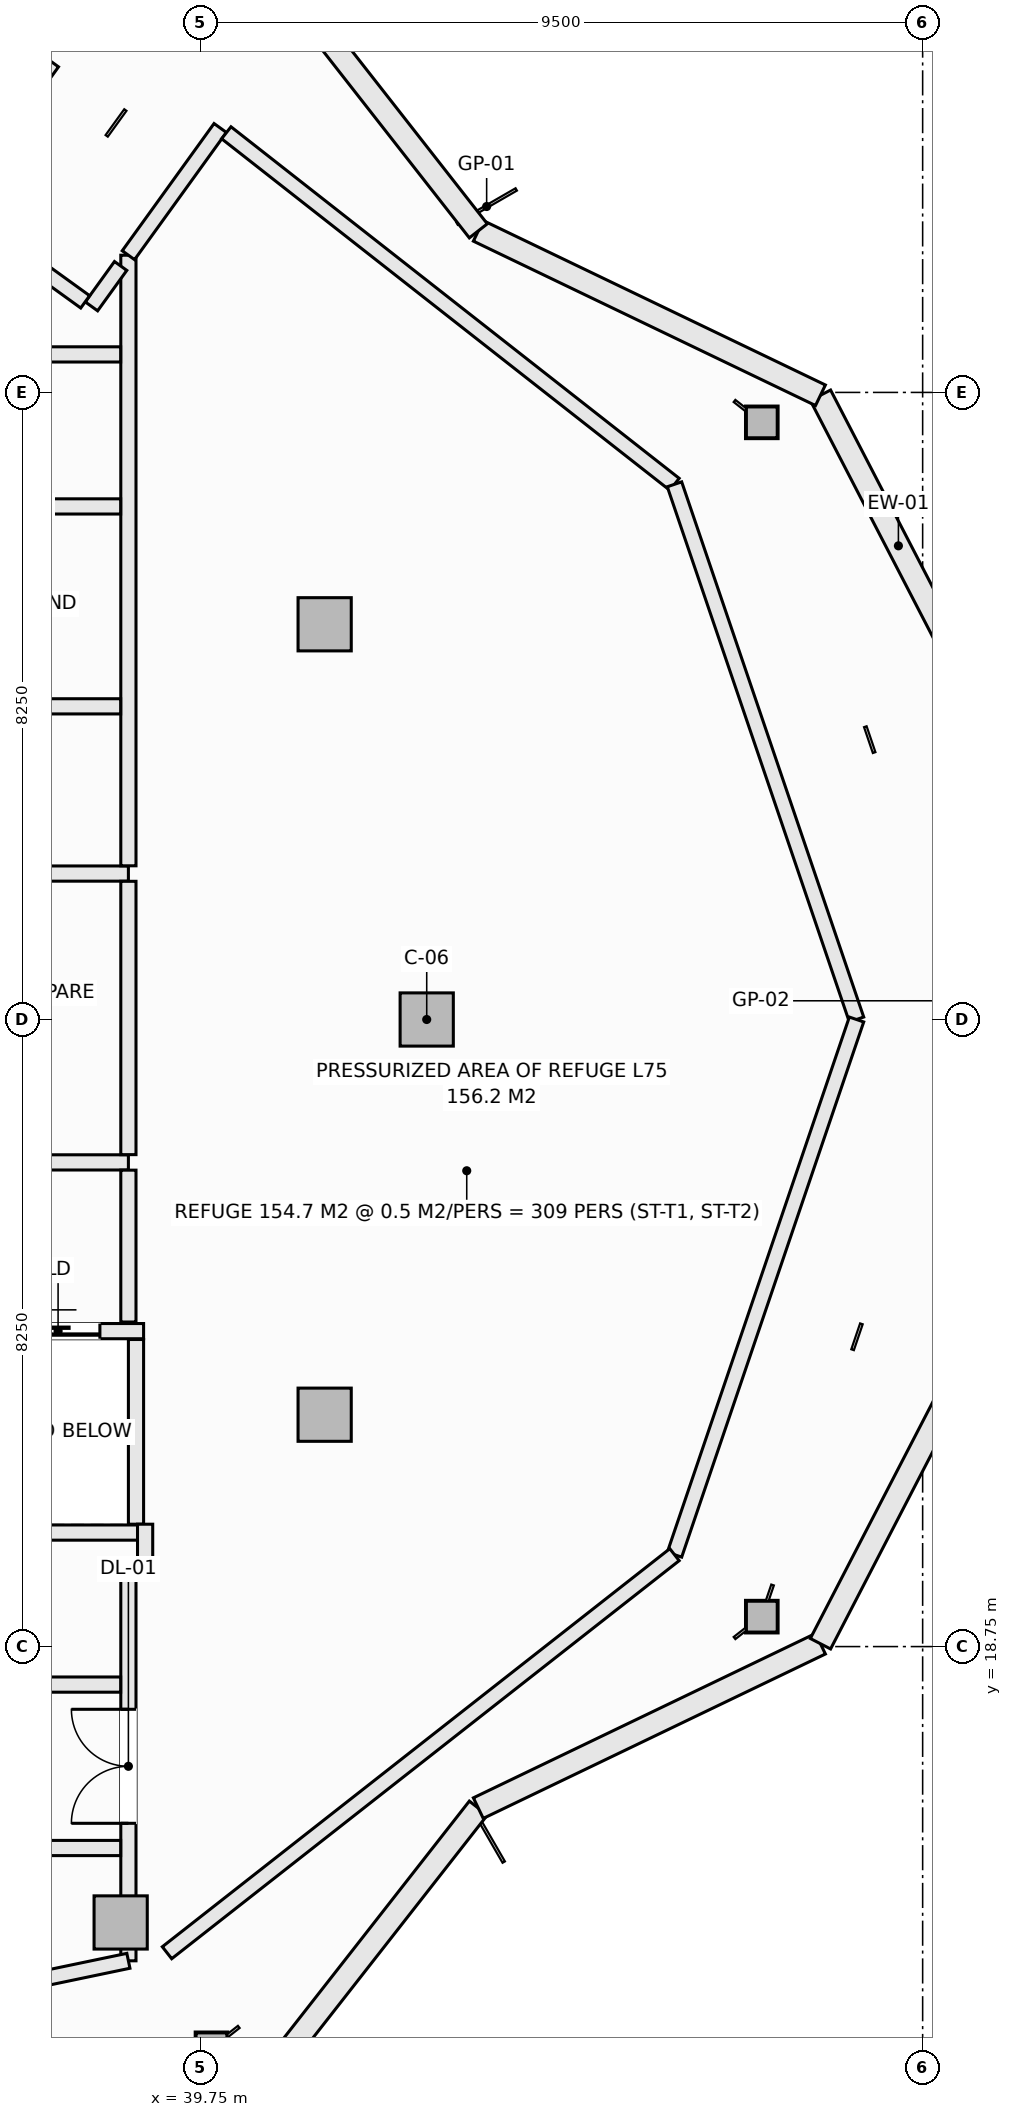
"""IFC4 building model, lengths in metres.
Left out: names, types, materials, properties, quantities, classifications, styles, units other than length and angle.
Written with IfcOpenShell. Run it as: python <this file> out.ifc"""

import sys

from ifc_helpers import new_model, si_unit, direction, frame, frame_2d, origin, origin_2d, place, context, subcontext, project, spatial, rectangle, hollow_rectangle, extrude, element, fill, save


model = new_model("IFC4")
c1 = context("Model", 3, precision=1e-05, world=origin(), true_north=direction((0.0, 1.0)))
c2 = subcontext(c1, "Body", "Model", "MODEL_VIEW")
j1 = project(units=[si_unit("LENGTHUNIT", "METRE"), si_unit("PLANEANGLEUNIT", "RADIAN")], contexts=[c1])
p1 = place(None, origin())
s1 = spatial("IfcSite", under=j1, at=p1, CompositionType="ELEMENT")
p2 = place(p1, origin())
s2 = spatial("IfcBuilding", under=s1, at=p2, CompositionType="ELEMENT")
p3 = place(p2, frame((0.0, 0.0, 275.6)))
s3 = spatial("IfcBuildingStorey", under=s2, at=p3, CompositionType="ELEMENT", Elevation=275.6)
for number, where, z_axis, x_axis in (
    (1, (47.134, 34.856, -0.32), (0.0, 0.0, 1.0), (1.0, 0.0, 0.0)),
    (2, (39.893, 13.465, -0.32), (0.0, 0.0, 1.0), (1.0, 0.0, 0.0)),
    (3, (47.134, 19.144, -0.32), (0.0, 0.0, 1.0), (1.0, 0.0, 0.0)),
):
    element("IfcColumn", number, at=place(p3, frame(where, z_axis=z_axis, x_axis=x_axis)), inside=s3, PredefinedType="COLUMN", context=c2, shape_type="SweptSolid", body=[
        extrude(hollow_rectangle(XDim=0.406, YDim=0.406, WallThickness=0.016, at=origin_2d()), origin(), (0.0, 0.0, 1.0), 6.04),
    ])
for number, where, z_axis, x_axis in (
    (4, (42.725, 27.0, -0.32), (0.0, 0.0, 1.0), (1.0, 0.0, 0.0)),
    (5, (41.382, 32.199, -0.32), (0.0, 0.0, 1.0), (1.0, 0.0, 0.0)),
    (6, (38.698, 15.121, -0.32), (0.0, 0.0, 1.0), (1.0, 0.0, 0.0)),
    (7, (41.382, 21.801, -0.32), (0.0, 0.0, 1.0), (1.0, 0.0, 0.0)),
):
    element("IfcColumn", number, at=place(p3, frame(where, z_axis=z_axis, x_axis=x_axis)), inside=s3, PredefinedType="COLUMN", context=c2, shape_type="SweptSolid", body=[
        extrude(rectangle(XDim=0.7, YDim=0.7, at=origin_2d()), origin(), (0.0, 0.0, 1.0), 6.04),
    ])
p4 = place(p3, frame((47.906, 35.212, 0.0), z_axis=(0.0, 0.0, 1.0), x_axis=(0.459801070243, -0.888021945564, 0.0)))
e8 = element("IfcWall", 8, at=p4, inside=s3, PredefinedType="SOLIDWALL", context=c2, shape_type="SweptSolid", body=[
    extrude(rectangle(XDim=4.461, YDim=0.3, at=frame_2d((2.23, 0.0))), origin(), (0.0, 0.0, 1.0), 1.15),
])
p5 = place(p3, frame((43.404, 37.375, 0.0), z_axis=(0.0, 0.0, 1.0), x_axis=(0.901346013132, -0.433099716706, 0.0)))
e9 = element("IfcWall", 9, at=p5, inside=s3, PredefinedType="SOLIDWALL", context=c2, shape_type="SweptSolid", body=[
    extrude(rectangle(XDim=4.994, YDim=0.3, at=frame_2d((2.497, 0.0))), origin(), (0.0, 0.0, 1.0), 1.15),
])
for number, where, z_axis, x_axis in (
    (10, (40.391, 41.225, 0.0), (0.0, 0.0, 1.0), (0.616, -0.787, 0.0)),
    (11, (40.391, 12.775, 0.0), (0.0, 0.0, 1.0), (0.616, 0.787, 0.0)),
):
    element("IfcWall", number, at=place(p3, frame(where, z_axis=z_axis, x_axis=x_axis)), inside=s3, PredefinedType="SOLIDWALL", context=c2, shape_type="SweptSolid", body=[
        extrude(rectangle(XDim=4.888, YDim=0.3, at=frame_2d((2.444, 0.0))), origin(), (0.0, 0.0, 1.0), 1.15),
    ])
p6 = place(p3, frame((43.404, 16.625, 0.0), z_axis=(0.0, 0.0, 1.0), x_axis=(0.901346013132, 0.433099716706, 0.0)))
e12 = element("IfcWall", 12, at=p6, inside=s3, PredefinedType="SOLIDWALL", context=c2, shape_type="SweptSolid", body=[
    extrude(rectangle(XDim=4.994, YDim=0.3, at=frame_2d((2.497, 0.0))), origin(), (0.0, 0.0, 1.0), 1.15),
])
p7 = place(p3, frame((47.906, 18.788, 0.0), z_axis=(0.0, 0.0, 1.0), x_axis=(0.459801070243, 0.888021945564, 0.0)))
e13 = element("IfcWall", 13, at=p7, inside=s3, PredefinedType="SOLIDWALL", context=c2, shape_type="SweptSolid", body=[
    extrude(rectangle(XDim=4.461, YDim=0.3, at=frame_2d((2.23, 0.0))), origin(), (0.0, 0.0, 1.0), 1.15),
])
p8 = place(p3, frame((36.75, 22.9, 0.0), z_axis=(0.0, 0.0, 1.0), x_axis=(1.0, 0.0, 0.0)))
e14 = element("IfcWall", 14, at=p8, inside=s3, PredefinedType="SOLIDWALL", context=c2, shape_type="SweptSolid", body=[
    extrude(rectangle(XDim=2.25, YDim=0.2, at=frame_2d((1.125, 0.0))), origin(), (0.0, 0.0, 1.0), 5.72),
])
p9 = place(p8, frame((0.575, 0.0, 0.0)))
e15 = element("IfcOpeningElement", 15, at=p9, cuts=e14, PredefinedType="OPENING", context=c2, shape_type="SweptSolid", body=[
    extrude(rectangle(XDim=1.1, YDim=2.2, at=frame_2d((0.55, 1.1))), frame((0.0, 0.11, 0.0), z_axis=(0.0, -1.0, 0.0), x_axis=(1.0, 0.0, 0.0)), (0.0, 0.0, 1.0), 0.22),
])
p10 = place(p3, frame((36.75, 20.25, 0.0), z_axis=(0.0, 0.0, 1.0), x_axis=(1.0, 0.0, 0.0)))
e16 = element("IfcWall", 16, at=p10, inside=s3, PredefinedType="SOLIDWALL", context=c2, shape_type="SweptSolid", body=[
    extrude(rectangle(XDim=2.25, YDim=0.2, at=frame_2d((1.125, 0.0))), origin(), (0.0, 0.0, 1.0), 5.72),
])
p11 = place(p3, frame((38.9, 20.36, 0.0), z_axis=(0.0, 0.0, 1.0), x_axis=(0.0, 1.0, 0.0)))
e17 = element("IfcWall", 17, at=p11, inside=s3, PredefinedType="SOLIDWALL", context=c2, shape_type="SweptSolid", body=[
    extrude(rectangle(XDim=2.43, YDim=0.2, at=frame_2d((1.215, 0.0))), origin(), (0.0, 0.0, 1.0), 5.72),
])
p12 = place(p3, frame((29.78, 25.12, 0.0), z_axis=(0.0, 0.0, 1.0), x_axis=(1.0, 0.0, 0.0)))
e18 = element("IfcWall", 18, at=p12, inside=s3, PredefinedType="SOLIDWALL", context=c2, shape_type="SweptSolid", body=[
    extrude(rectangle(XDim=9.02, YDim=0.2, at=frame_2d((4.51, 0.0))), origin(), (0.0, 0.0, 1.0), 5.72),
])
p13 = place(p12, frame((2.04, 0.0, 0.0)))
e19 = element("IfcOpeningElement", 19, at=p13, cuts=e18, PredefinedType="OPENING", context=c2, shape_type="SweptSolid", body=[
    extrude(rectangle(XDim=0.95, YDim=2.1, at=frame_2d((0.475, 1.05))), frame((0.0, 0.11, 0.0), z_axis=(0.0, -1.0, 0.0), x_axis=(1.0, 0.0, 0.0)), (0.0, 0.0, 1.0), 0.22),
])
p14 = place(p12, frame((6.14, 0.0, 0.0)))
e20 = element("IfcOpeningElement", 20, at=p14, cuts=e18, PredefinedType="OPENING", context=c2, shape_type="SweptSolid", body=[
    extrude(rectangle(XDim=0.95, YDim=2.1, at=frame_2d((0.475, 1.05))), frame((0.0, 0.11, 0.0), z_axis=(0.0, -1.0, 0.0), x_axis=(1.0, 0.0, 0.0)), (0.0, 0.0, 1.0), 0.22),
])
p15 = place(p3, frame((30.102, 28.92, 0.0), z_axis=(0.0, 0.0, 1.0), x_axis=(1.0, 0.0, 0.0)))
e21 = element("IfcWall", 21, at=p15, inside=s3, PredefinedType="SOLIDWALL", context=c2, shape_type="SweptSolid", body=[
    extrude(rectangle(XDim=8.698, YDim=0.2, at=frame_2d((4.349, 0.0))), origin(), (0.0, 0.0, 1.0), 5.72),
])
p16 = place(p3, frame((38.8, 14.616, 0.0), z_axis=(0.0, 0.0, 1.0), x_axis=(0.0, 1.0, 0.0)))
e22 = element("IfcWall", 22, at=p16, inside=s3, PredefinedType="SOLIDWALL", context=c2, shape_type="SweptSolid", body=[
    extrude(rectangle(XDim=5.184, YDim=0.2, at=frame_2d((2.592, 0.0))), origin(), (0.0, 0.0, 1.0), 5.168),
])
p17 = place(p16, frame((1.809, 0.0, 0.0)))
e23 = element("IfcOpeningElement", 23, at=p17, cuts=e22, PredefinedType="OPENING", context=c2, shape_type="SweptSolid", body=[
    extrude(rectangle(XDim=1.5, YDim=2.2, at=frame_2d((0.75, 1.1))), frame((0.0, 0.11, 0.0), z_axis=(0.0, -1.0, 0.0), x_axis=(1.0, 0.0, 0.0)), (0.0, 0.0, 1.0), 0.22),
])
p18 = place(p3, frame((38.8, 23.02, 0.0), z_axis=(0.0, 0.0, 1.0), x_axis=(0.0, 1.0, 0.0)))
e24 = element("IfcWall", 24, at=p18, inside=s3, PredefinedType="SOLIDWALL", context=c2, shape_type="SweptSolid", body=[
    extrude(rectangle(XDim=1.998, YDim=0.2, at=frame_2d((0.999, 0.0))), origin(), (0.0, 0.0, 1.0), 5.72),
])
p19 = place(p3, frame((38.8, 25.222, 0.0), z_axis=(0.0, 0.0, 1.0), x_axis=(0.0, 1.0, 0.0)))
e25 = element("IfcWall", 25, at=p19, inside=s3, PredefinedType="SOLIDWALL", context=c2, shape_type="SweptSolid", body=[
    extrude(rectangle(XDim=3.596, YDim=0.2, at=frame_2d((1.798, 0.0))), origin(), (0.0, 0.0, 1.0), 5.72),
])
p20 = place(p3, frame((38.8, 29.022, 0.0), z_axis=(0.0, 0.0, 1.0), x_axis=(0.0, 1.0, 0.0)))
e26 = element("IfcWall", 26, at=p20, inside=s3, PredefinedType="SOLIDWALL", context=c2, shape_type="SweptSolid", body=[
    extrude(rectangle(XDim=8.033, YDim=0.2, at=frame_2d((4.017, 0.0))), origin(), (0.0, 0.0, 1.0), 5.72),
])
p21 = place(p3, frame((27.252, 35.75, 0.0), z_axis=(0.0, 0.0, 1.0), x_axis=(1.0, 0.0, 0.0)))
e27 = element("IfcWall", 27, at=p21, inside=s3, PredefinedType="SOLIDWALL", context=c2, shape_type="SweptSolid", body=[
    extrude(rectangle(XDim=11.446, YDim=0.2, at=frame_2d((5.723, 0.0))), origin(), (0.0, 0.0, 1.0), 5.168),
])
p22 = place(p21, frame((2.421, 0.0, 0.0)))
e28 = element("IfcOpeningElement", 28, at=p22, cuts=e27, PredefinedType="OPENING", context=c2, shape_type="SweptSolid", body=[
    extrude(rectangle(XDim=0.95, YDim=2.1, at=frame_2d((0.475, 1.05))), frame((0.0, 0.11, 0.0), z_axis=(0.0, -1.0, 0.0), x_axis=(1.0, 0.0, 0.0)), (0.0, 0.0, 1.0), 0.22),
])
p23 = place(p21, frame((7.733, 0.0, 0.0)))
e29 = element("IfcOpeningElement", 29, at=p23, cuts=e27, PredefinedType="OPENING", context=c2, shape_type="SweptSolid", body=[
    extrude(rectangle(XDim=0.95, YDim=2.1, at=frame_2d((0.475, 1.05))), frame((0.0, 0.11, 0.0), z_axis=(0.0, -1.0, 0.0), x_axis=(1.0, 0.0, 0.0)), (0.0, 0.0, 1.0), 0.22),
])
p24 = place(p3, frame((29.78, 33.75, 0.0), z_axis=(0.0, 0.0, 1.0), x_axis=(1.0, 0.0, 0.0)))
e30 = element("IfcWall", 30, at=p24, inside=s3, PredefinedType="SOLIDWALL", context=c2, shape_type="SweptSolid", body=[
    extrude(rectangle(XDim=8.918, YDim=0.2, at=frame_2d((4.459, 0.0))), origin(), (0.0, 0.0, 1.0), 5.72),
])
p25 = place(p24, frame((5.25, 0.0, 0.0)))
e31 = element("IfcOpeningElement", 31, at=p25, cuts=e30, PredefinedType="OPENING", context=c2, shape_type="SweptSolid", body=[
    extrude(rectangle(XDim=0.95, YDim=2.1, at=frame_2d((0.475, 1.05))), frame((0.0, 0.11, 0.0), z_axis=(0.0, -1.0, 0.0), x_axis=(1.0, 0.0, 0.0)), (0.0, 0.0, 1.0), 0.22),
])
for number, where, z_axis, x_axis in (
    (32, (29.882, 31.12, 0.0), (0.0, 0.0, 1.0), (1.0, 0.0, 0.0)),
    (33, (29.882, 18.25, 0.0), (0.0, 0.0, 1.0), (1.0, 0.0, 0.0)),
):
    element("IfcWall", number, at=place(p3, frame(where, z_axis=z_axis, x_axis=x_axis)), inside=s3, PredefinedType="SOLIDWALL", context=c2, shape_type="SweptSolid", body=[
        extrude(rectangle(XDim=8.816, YDim=0.2, at=frame_2d((4.408, 0.0))), origin(), (0.0, 0.0, 1.0), 5.72),
    ])
p26 = place(p3, frame((29.882, 16.1, 0.0), z_axis=(0.0, 0.0, 1.0), x_axis=(1.0, 0.0, 0.0)))
e34 = element("IfcWall", 34, at=p26, inside=s3, PredefinedType="SOLIDWALL", context=c2, shape_type="SweptSolid", body=[
    extrude(rectangle(XDim=8.816, YDim=0.2, at=frame_2d((4.408, 0.0))), origin(), (0.0, 0.0, 1.0), 5.72),
])
p27 = place(p26, frame((5.54, 0.0, 0.0)))
e35 = element("IfcOpeningElement", 35, at=p27, cuts=e34, PredefinedType="OPENING", context=c2, shape_type="SweptSolid", body=[
    extrude(rectangle(XDim=0.95, YDim=2.1, at=frame_2d((0.475, 1.05))), frame((0.0, 0.11, 0.0), z_axis=(0.0, -1.0, 0.0), x_axis=(1.0, 0.0, 0.0)), (0.0, 0.0, 1.0), 0.22),
])
p28 = place(p3, frame((39.02, 19.8, 0.0), z_axis=(0.0, 0.0, 1.0), x_axis=(0.0, 1.0, 0.0)))
e36 = element("IfcWall", 36, at=p28, inside=s3, PredefinedType="SOLIDWALL", context=c2, shape_type="SweptSolid", body=[
    extrude(rectangle(XDim=0.56, YDim=0.2, at=frame_2d((0.28, 0.0))), origin(), (0.0, 0.0, 1.0), 5.72),
])
p29 = place(p3, frame((38.314, 36.382, 0.0), z_axis=(0.0, 0.0, 1.0), x_axis=(0.585069222784, 0.810983356519, 0.0)))
e37 = element("IfcWall", 37, at=p29, inside=s3, PredefinedType="SOLIDWALL", context=c2, shape_type="SweptSolid", body=[
    extrude(rectangle(XDim=0.656, YDim=0.2, at=frame_2d((0.328, 0.0))), origin(), (0.0, 0.0, 1.0), 5.72),
])
p30 = place(p3, frame((38.8, 37.055, 0.0), z_axis=(0.0, 0.0, 1.0), x_axis=(0.585158028997, 0.810919281495, 0.0)))
e38 = element("IfcWall", 38, at=p30, inside=s3, PredefinedType="SOLIDWALL", context=c2, shape_type="SweptSolid", body=[
    extrude(rectangle(XDim=2.064, YDim=0.2, at=frame_2d((1.032, 0.0))), origin(), (0.0, 0.0, 1.0), 5.72),
])
p31 = place(p3, frame((40.088, 38.666, 0.0), z_axis=(0.0, 0.0, 1.0), x_axis=(0.78684597277, -0.61714942691, 0.0)))
e39 = element("IfcWall", 39, at=p31, inside=s3, PredefinedType="SOLIDWALL", context=c2, shape_type="SweptSolid", body=[
    extrude(rectangle(XDim=7.494, YDim=0.2, at=frame_2d((3.747, 0.0))), origin(), (0.0, 0.0, 1.0), 5.72),
])
for number, where, z_axis, x_axis in (
    (40, (45.985, 34.041, 0.0), (0.0, 0.0, 1.0), (0.322, -0.947, 0.0)),
    (41, (45.985, 19.959, 0.0), (0.0, 0.0, 1.0), (0.322, 0.947, 0.0)),
):
    element("IfcWall", number, at=place(p3, frame(where, z_axis=z_axis, x_axis=x_axis)), inside=s3, PredefinedType="SOLIDWALL", context=c2, shape_type="SweptSolid", body=[
        extrude(rectangle(XDim=7.437, YDim=0.2, at=frame_2d((3.719, 0.0))), origin(), (0.0, 0.0, 1.0), 5.72),
    ])
p32 = place(p3, frame((39.308, 14.722, 0.0), z_axis=(0.0, 0.0, 1.0), x_axis=(0.786842185736, 0.617154255228, 0.0)))
e42 = element("IfcWall", 42, at=p32, inside=s3, PredefinedType="SOLIDWALL", context=c2, shape_type="SweptSolid", body=[
    extrude(rectangle(XDim=8.486, YDim=0.2, at=frame_2d((4.243, 0.0))), origin(), (0.0, 0.0, 1.0), 5.72),
])
p33 = place(p3, frame((30.125, 12.806, 0.0), z_axis=(0.0, 0.0, 1.0), x_axis=(0.978920560283, 0.204241368621, 0.0)))
e43 = element("IfcWall", 43, at=p33, inside=s3, PredefinedType="SOLIDWALL", context=c2, shape_type="SweptSolid", body=[
    extrude(rectangle(XDim=8.862, YDim=0.2, at=frame_2d((4.431, 0.0))), origin(), (0.0, 0.0, 1.0), 5.72),
])
p34 = place(p3, frame((36.452, 37.726, 0.0), z_axis=(0.0, 0.0, 1.0), x_axis=(0.585304643713, 0.810813464397, 0.0)))
e44 = element("IfcWall", 44, at=p34, inside=s3, PredefinedType="SOLIDWALL", context=c2, shape_type="SweptSolid", body=[
    extrude(rectangle(XDim=2.302, YDim=0.2, at=frame_2d((1.151, 0.0))), origin(), (0.0, 0.0, 1.0), 5.72),
])
p35 = place(p3, frame((36.535, 37.666, 0.0), z_axis=(0.0, 0.0, 1.0), x_axis=(0.810829966336, -0.585281783154, 0.0)))
e45 = element("IfcWall", 45, at=p35, inside=s3, PredefinedType="SOLIDWALL", context=c2, shape_type="SweptSolid", body=[
    extrude(rectangle(XDim=2.092, YDim=0.2, at=frame_2d((1.046, 0.0))), origin(), (0.0, 0.0, 1.0), 5.168),
])
p36 = place(p9, origin())
e46 = element("IfcDoor", 46, at=p36, inside=s3, OperationType="SLIDING_TO_LEFT", PredefinedType="DOOR", context=c2, shape_type="SweptSolid", body=[
    extrude(rectangle(XDim=1.1, YDim=2.2, at=frame_2d((0.55, 1.1))), frame((0.0, 0.025, 0.0), z_axis=(0.0, -1.0, 0.0), x_axis=(1.0, 0.0, 0.0)), (0.0, 0.0, 1.0), 0.05),
])
fill(e15, e46)
p37 = place(p17, origin())
e47 = element("IfcDoor", 47, at=p37, inside=s3, OperationType="DOUBLE_DOOR_SINGLE_SWING", PredefinedType="DOOR", context=c2, shape_type="SweptSolid", body=[
    extrude(rectangle(XDim=1.5, YDim=2.2, at=frame_2d((0.75, 1.1))), frame((0.0, 0.025, 0.0), z_axis=(0.0, -1.0, 0.0), x_axis=(1.0, 0.0, 0.0)), (0.0, 0.0, 1.0), 0.05),
])
fill(e23, e47)
save(model, sys.argv[1])
